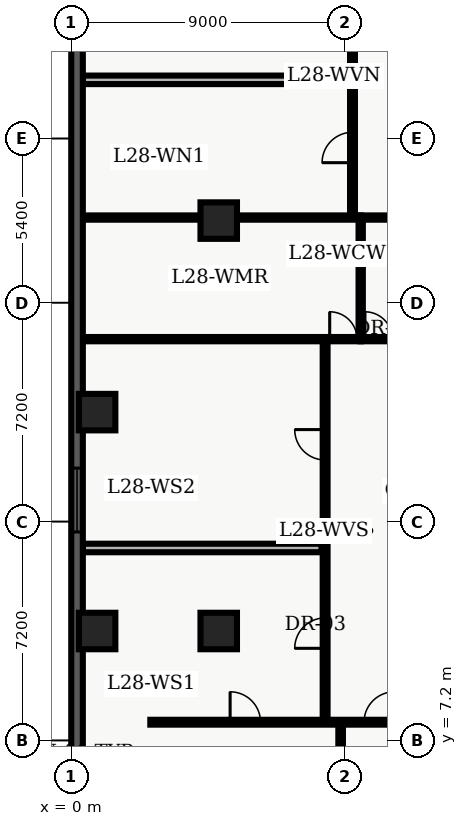
"""IFC4 building model, lengths in metres.
Left out: names, types, materials, properties, quantities, classifications, styles, units other than length and angle.
Written with IfcOpenShell. Run it as: python <this file> out.ifc"""

import sys

from ifc_helpers import new_model, entity, si_unit, converted_unit, direction, frame, origin_with_axes, origin_2d_with_axis, place, context, subcontext, project, spatial, polyline, rectangle, outline, extrude, element, fill, save


model = new_model("IFC4")
c1 = context("Model", 3, precision=1e-05, world=origin_with_axes(), true_north=direction((0.0, 1.0)))
c2 = subcontext(c1, "Body", "Model", "MODEL_VIEW")
j1 = project(units=[si_unit("LENGTHUNIT", "METRE"), converted_unit("PLANEANGLEUNIT", "DEGREE", entity("IfcPlaneAngleMeasure", 0.017), si_unit("PLANEANGLEUNIT", "RADIAN"), dimensions=[0, 0, 0, 0, 0, 0, 0])], contexts=[c1])
p1 = place(None, origin_with_axes())
s1 = spatial("IfcSite", under=j1, at=p1, CompositionType="ELEMENT")
p2 = place(p1, origin_with_axes())
s2 = spatial("IfcBuilding", under=s1, at=p2, CompositionType="ELEMENT")
p3 = place(p2, frame((0.0, 0.0, 116.4), z_axis=(0.0, 0.0, 1.0), x_axis=(1.0, 0.0, 0.0)))
s3 = spatial("IfcBuildingStorey", under=s2, at=p3, CompositionType="ELEMENT", Elevation=116.4)
for number, where, z_axis, x_axis in (
    (1, (4.85, 10.8, 0.0), (0.0, 0.0, 1.0), (1.0, 0.0, 0.0)),
    (2, (4.85, 24.3, 0.0), (0.0, 0.0, 1.0), (1.0, 0.0, 0.0)),
    (3, (0.85, 10.8, 0.0), (0.0, 0.0, 1.0), (1.0, 0.0, 0.0)),
    (4, (0.85, 18.0, 0.0), (0.0, 0.0, 1.0), (1.0, 0.0, 0.0)),
):
    element("IfcColumn", number, at=place(p3, frame(where, z_axis=z_axis, x_axis=x_axis)), inside=s3, PredefinedType="COLUMN", context=c2, shape_type="SweptSolid", body=[
        extrude(rectangle(XDim=1.2, YDim=1.2, at=origin_2d_with_axis()), origin_with_axes(), (0.0, 0.0, 1.0), 3.9),
    ])
p4 = place(p3, frame((9.52, 20.4, 0.0), z_axis=(0.0, 0.0, 1.0), x_axis=(0.0, 1.0, 0.0)))
e5 = element("IfcWall", 5, at=p4, inside=s3, PredefinedType="PARTITIONING", context=c2, shape_type="SweptSolid", body=[
    extrude(outline(polyline([(0.0, -0.07), (4.0, -0.07), (4.0, 0.07), (0.0, 0.07), (0.0, -0.07)])), origin_with_axes(), (0.0, 0.0, 1.0), 2.7),
])
p5 = place(p3, frame((9.52, 20.4, 0.0), z_axis=(0.0, 0.0, 1.0), x_axis=(1.0, 0.0, 0.0)))
e6 = element("IfcWall", 6, at=p5, inside=s3, PredefinedType="PARTITIONING", context=c2, shape_type="SweptSolid", body=[
    extrude(outline(polyline([(0.0, -0.07), (1.58, -0.07), (1.58, 0.07), (0.0, 0.07), (0.0, -0.07)])), origin_with_axes(), (0.0, 0.0, 1.0), 2.7),
])
p6 = place(p5, frame((0.59, 0.0, 0.0), z_axis=(0.0, 0.0, 1.0), x_axis=(1.0, 0.0, 0.0)))
e7 = element("IfcOpeningElement", 7, at=p6, cuts=e6, PredefinedType="OPENING", context=c2, shape_type="SweptSolid", body=[
    extrude(rectangle(XDim=0.9, YDim=0.16, at=origin_2d_with_axis()), origin_with_axes(), (0.0, 0.0, 1.0), 2.15),
])
p7 = place(p3, frame((9.52, 24.4, 0.0), z_axis=(0.0, 0.0, 1.0), x_axis=(1.0, 0.0, 0.0)))
e8 = element("IfcWall", 8, at=p7, inside=s3, PredefinedType="PARTITIONING", context=c2, shape_type="SweptSolid", body=[
    extrude(outline(polyline([(0.0, -0.07), (1.58, -0.07), (1.58, 0.07), (0.0, 0.07), (0.0, -0.07)])), origin_with_axes(), (0.0, 0.0, 1.0), 2.7),
])
p8 = place(p3, frame((2.6, 7.8, 0.0), z_axis=(0.0, 0.0, 1.0), x_axis=(1.0, 0.0, 0.0)))
e9 = element("IfcWall", 9, at=p8, inside=s3, PredefinedType="PARTITIONING", context=c2, shape_type="SweptSolid", body=[
    extrude(outline(polyline([(0.0, -0.08), (18.625, -0.08), (18.625, 0.08), (0.0, 0.08), (0.0, -0.08)])), origin_with_axes(), (0.0, 0.0, 1.0), 2.7),
])
p9 = place(p8, frame((3.125, 0.0, 0.0), z_axis=(0.0, 0.0, 1.0), x_axis=(1.0, 0.0, 0.0)))
e10 = element("IfcOpeningElement", 10, at=p9, cuts=e9, PredefinedType="OPENING", context=c2, shape_type="SweptSolid", body=[
    extrude(rectangle(XDim=1.0, YDim=0.18, at=origin_2d_with_axis()), origin_with_axes(), (0.0, 0.0, 1.0), 2.15),
])
p10 = place(p8, frame((7.53, 0.0, 0.0), z_axis=(0.0, 0.0, 1.0), x_axis=(1.0, 0.0, 0.0)))
e11 = element("IfcOpeningElement", 11, at=p10, cuts=e9, PredefinedType="OPENING", context=c2, shape_type="SweptSolid", body=[
    extrude(rectangle(XDim=1.0, YDim=0.18, at=origin_2d_with_axis()), origin_with_axes(), (0.0, 0.0, 1.0), 2.15),
])
p11 = place(p8, frame((11.271, 0.0, 0.0), z_axis=(0.0, 0.0, 1.0), x_axis=(1.0, 0.0, 0.0)))
e12 = element("IfcOpeningElement", 12, at=p11, cuts=e9, PredefinedType="OPENING", context=c2, shape_type="SweptSolid", body=[
    extrude(rectangle(XDim=1.0, YDim=0.18, at=origin_2d_with_axis()), origin_with_axes(), (0.0, 0.0, 1.0), 2.15),
])
p12 = place(p8, frame((16.12, 0.0, 0.0), z_axis=(0.0, 0.0, 1.0), x_axis=(1.0, 0.0, 0.0)))
e13 = element("IfcOpeningElement", 13, at=p12, cuts=e9, PredefinedType="OPENING", context=c2, shape_type="SweptSolid", body=[
    extrude(rectangle(XDim=1.0, YDim=0.18, at=origin_2d_with_axis()), origin_with_axes(), (0.0, 0.0, 1.0), 2.15),
])
p13 = place(p3, frame((8.35, 7.8, 0.0), z_axis=(0.0, 0.0, 1.0), x_axis=(0.0, 1.0, 0.0)))
e14 = element("IfcWall", 14, at=p13, inside=s3, PredefinedType="PARTITIONING", context=c2, shape_type="SweptSolid", body=[
    extrude(outline(polyline([(0.0, -0.08), (12.6, -0.08), (12.6, 0.08), (0.0, 0.08), (0.0, -0.08)])), origin_with_axes(), (0.0, 0.0, 1.0), 2.7),
])
p14 = place(p13, frame((2.93, 0.0, 0.0), z_axis=(0.0, 0.0, 1.0), x_axis=(1.0, 0.0, 0.0)))
e15 = element("IfcOpeningElement", 15, at=p14, cuts=e14, PredefinedType="OPENING", context=c2, shape_type="SweptSolid", body=[
    extrude(rectangle(XDim=1.0, YDim=0.18, at=origin_2d_with_axis()), origin_with_axes(), (0.0, 0.0, 1.0), 2.15),
])
p15 = place(p13, frame((9.126, 0.0, 0.0), z_axis=(0.0, 0.0, 1.0), x_axis=(1.0, 0.0, 0.0)))
e16 = element("IfcOpeningElement", 16, at=p15, cuts=e14, PredefinedType="OPENING", context=c2, shape_type="SweptSolid", body=[
    extrude(rectangle(XDim=1.0, YDim=0.18, at=origin_2d_with_axis()), origin_with_axes(), (0.0, 0.0, 1.0), 2.15),
])
p16 = place(p3, frame((9.25, 24.4, 0.0), z_axis=(0.0, 0.0, 1.0), x_axis=(0.0, 1.0, 0.0)))
e17 = element("IfcWall", 17, at=p16, inside=s3, PredefinedType="PARTITIONING", context=c2, shape_type="SweptSolid", body=[
    extrude(outline(polyline([(0.0, -0.08), (16.1, -0.08), (16.1, 0.08), (0.0, 0.08), (0.0, -0.08)])), origin_with_axes(), (0.0, 0.0, 1.0), 2.7),
])
p17 = place(p16, frame((2.305, 0.0, 0.0), z_axis=(0.0, 0.0, 1.0), x_axis=(1.0, 0.0, 0.0)))
e18 = element("IfcOpeningElement", 18, at=p17, cuts=e17, PredefinedType="OPENING", context=c2, shape_type="SweptSolid", body=[
    extrude(rectangle(XDim=1.0, YDim=0.18, at=origin_2d_with_axis()), origin_with_axes(), (0.0, 0.0, 1.0), 2.15),
])
p18 = place(p16, frame((7.098, 0.0, 0.0), z_axis=(0.0, 0.0, 1.0), x_axis=(1.0, 0.0, 0.0)))
e19 = element("IfcOpeningElement", 19, at=p18, cuts=e17, PredefinedType="OPENING", context=c2, shape_type="SweptSolid", body=[
    extrude(rectangle(XDim=1.0, YDim=0.18, at=origin_2d_with_axis()), origin_with_axes(), (0.0, 0.0, 1.0), 2.15),
])
p19 = place(p16, frame((12.819, 0.0, 0.0), z_axis=(0.0, 0.0, 1.0), x_axis=(1.0, 0.0, 0.0)))
e20 = element("IfcOpeningElement", 20, at=p19, cuts=e17, PredefinedType="OPENING", context=c2, shape_type="SweptSolid", body=[
    extrude(rectangle(XDim=1.0, YDim=0.18, at=origin_2d_with_axis()), origin_with_axes(), (0.0, 0.0, 1.0), 2.15),
])
p20 = place(p3, frame((0.36, 20.4, 0.0), z_axis=(0.0, 0.0, 1.0), x_axis=(1.0, 0.0, 0.0)))
e21 = element("IfcWall", 21, at=p20, inside=s3, PredefinedType="PARTITIONING", context=c2, shape_type="SweptSolid", body=[
    extrude(outline(polyline([(0.0, -0.07), (9.16, -0.07), (9.16, 0.07), (0.0, 0.07), (0.0, -0.07)])), origin_with_axes(), (0.0, 0.0, 1.0), 2.7),
])
p21 = place(p20, frame((8.59, 0.0, 0.0), z_axis=(0.0, 0.0, 1.0), x_axis=(1.0, 0.0, 0.0)))
e22 = element("IfcOpeningElement", 22, at=p21, cuts=e21, PredefinedType="OPENING", context=c2, shape_type="SweptSolid", body=[
    extrude(rectangle(XDim=0.9, YDim=0.16, at=origin_2d_with_axis()), origin_with_axes(), (0.0, 0.0, 1.0), 2.15),
])
p22 = place(p3, frame((0.36, 24.4, 0.0), z_axis=(0.0, 0.0, 1.0), x_axis=(1.0, 0.0, 0.0)))
e23 = element("IfcWall", 23, at=p22, inside=s3, PredefinedType="PARTITIONING", context=c2, shape_type="SweptSolid", body=[
    extrude(outline(polyline([(0.0, -0.07), (9.16, -0.07), (9.16, 0.07), (0.0, 0.07), (0.0, -0.07)])), origin_with_axes(), (0.0, 0.0, 1.0), 2.7),
])
p23 = place(p3, frame((0.375, 13.531, 0.0), z_axis=(0.0, 0.0, 1.0), x_axis=(1.0, 0.0, 0.0)))
e24 = element("IfcWall", 24, at=p23, inside=s3, PredefinedType="PARTITIONING", context=c2, shape_type="SweptSolid", body=[
    extrude(outline(polyline([(0.0, -0.14), (7.855, -0.14), (7.855, 0.14), (0.0, 0.14), (0.0, -0.14)])), origin_with_axes(), (0.0, 0.0, 1.0), 2.7),
])
p24 = place(p3, frame((0.375, 28.93, 0.0), z_axis=(0.0, 0.0, 1.0), x_axis=(1.0, 0.0, 0.0)))
e25 = element("IfcWall", 25, at=p24, inside=s3, PredefinedType="PARTITIONING", context=c2, shape_type="SweptSolid", body=[
    extrude(outline(polyline([(0.0, -0.14), (8.755, -0.14), (8.755, 0.14), (0.0, 0.14), (0.0, -0.14)])), origin_with_axes(), (0.0, 0.0, 1.0), 2.7),
])
p25 = place(p3, frame((8.86, 0.36, 0.0), z_axis=(0.0, 0.0, 1.0), x_axis=(0.0, 1.0, 0.0)))
e26 = element("IfcWall", 26, at=p25, inside=s3, PredefinedType="PARTITIONING", context=c2, shape_type="SweptSolid", body=[
    extrude(outline(polyline([(0.0, -0.075), (7.34, -0.075), (7.34, 0.075), (0.0, 0.075), (0.0, -0.075)])), origin_with_axes(), (0.0, 0.0, 1.0), 2.7),
])
p26 = place(p3, frame((0.19, 2.78, 0.0), z_axis=(0.0, 0.0, 1.0), x_axis=(0.0, 1.0, 0.0)))
e27 = element("IfcWall", 27, at=p26, inside=s3, PredefinedType="SOLIDWALL", context=c2, shape_type="SweptSolid", body=[
    extrude(outline(polyline([(0.0, -0.19), (43.42, -0.19), (43.42, 0.19), (0.0, 0.19), (0.0, -0.19)])), origin_with_axes(), (0.0, 0.0, 1.0), 3.66),
])
p27 = place(p26, frame((2.946, 0.0, 0.45), z_axis=(0.0, 0.0, 1.0), x_axis=(1.0, 0.0, 0.0)))
e28 = element("IfcOpeningElement", 28, at=p27, cuts=e27, PredefinedType="OPENING", context=c2, shape_type="SweptSolid", body=[
    extrude(rectangle(XDim=2.1, YDim=0.4, at=origin_2d_with_axis()), origin_with_axes(), (0.0, 0.0, 1.0), 2.2),
])
p28 = place(p26, frame((12.328, 0.0, 0.45), z_axis=(0.0, 0.0, 1.0), x_axis=(1.0, 0.0, 0.0)))
e29 = element("IfcOpeningElement", 29, at=p28, cuts=e27, PredefinedType="OPENING", context=c2, shape_type="SweptSolid", body=[
    extrude(rectangle(XDim=2.1, YDim=0.4, at=origin_2d_with_axis()), origin_with_axes(), (0.0, 0.0, 1.0), 2.2),
])
p29 = place(p26, frame((40.024, 0.0, 0.45), z_axis=(0.0, 0.0, 1.0), x_axis=(1.0, 0.0, 0.0)))
e30 = element("IfcOpeningElement", 30, at=p29, cuts=e27, PredefinedType="OPENING", context=c2, shape_type="SweptSolid", body=[
    extrude(rectangle(XDim=2.1, YDim=0.4, at=origin_2d_with_axis()), origin_with_axes(), (0.0, 0.0, 1.0), 2.2),
])
p30 = place(p5, frame((0.59, 0.0, 0.0), z_axis=(0.0, 0.0, 1.0), x_axis=(1.0, 0.0, 0.0)))
e31 = element("IfcDoor", 31, at=p30, inside=s3, OperationType="SINGLE_SWING_LEFT", PredefinedType="DOOR", context=c2, shape_type="SweptSolid", body=[
    extrude(rectangle(XDim=0.9, YDim=0.084, at=origin_2d_with_axis()), origin_with_axes(), (0.0, 0.0, 1.0), 2.15),
])
fill(e7, e31)
p31 = place(p20, frame((8.59, 0.0, 0.0), z_axis=(0.0, 0.0, 1.0), x_axis=(1.0, 0.0, 0.0)))
e32 = element("IfcDoor", 32, at=p31, inside=s3, OperationType="SINGLE_SWING_LEFT", PredefinedType="DOOR", context=c2, shape_type="SweptSolid", body=[
    extrude(rectangle(XDim=0.9, YDim=0.084, at=origin_2d_with_axis()), origin_with_axes(), (0.0, 0.0, 1.0), 2.15),
])
fill(e22, e32)
p32 = place(p13, frame((2.93, 0.0, 0.0), z_axis=(0.0, 0.0, 1.0), x_axis=(1.0, 0.0, 0.0)))
e33 = element("IfcDoor", 33, at=p32, inside=s3, OperationType="SINGLE_SWING_LEFT", PredefinedType="DOOR", context=c2, shape_type="SweptSolid", body=[
    extrude(rectangle(XDim=1.0, YDim=0.09, at=origin_2d_with_axis()), origin_with_axes(), (0.0, 0.0, 1.0), 2.15),
])
fill(e15, e33)
p33 = place(p13, frame((9.126, 0.0, 0.0), z_axis=(0.0, 0.0, 1.0), x_axis=(1.0, 0.0, 0.0)))
e34 = element("IfcDoor", 34, at=p33, inside=s3, OperationType="SINGLE_SWING_RIGHT", PredefinedType="DOOR", context=c2, shape_type="SweptSolid", body=[
    extrude(rectangle(XDim=1.0, YDim=0.09, at=origin_2d_with_axis()), origin_with_axes(), (0.0, 0.0, 1.0), 2.15),
])
fill(e16, e34)
p34 = place(p16, frame((2.305, 0.0, 0.0), z_axis=(0.0, 0.0, 1.0), x_axis=(1.0, 0.0, 0.0)))
e35 = element("IfcDoor", 35, at=p34, inside=s3, OperationType="SINGLE_SWING_LEFT", PredefinedType="DOOR", context=c2, shape_type="SweptSolid", body=[
    extrude(rectangle(XDim=1.0, YDim=0.09, at=origin_2d_with_axis()), origin_with_axes(), (0.0, 0.0, 1.0), 2.15),
])
fill(e18, e35)
p35 = place(p8, frame((3.125, 0.0, 0.0), z_axis=(0.0, 0.0, 1.0), x_axis=(1.0, 0.0, 0.0)))
e36 = element("IfcDoor", 36, at=p35, inside=s3, OperationType="SINGLE_SWING_LEFT", PredefinedType="DOOR", context=c2, shape_type="SweptSolid", body=[
    extrude(rectangle(XDim=1.0, YDim=0.09, at=origin_2d_with_axis()), origin_with_axes(), (0.0, 0.0, 1.0), 2.15),
])
fill(e10, e36)
p36 = place(p8, frame((7.53, 0.0, 0.0), z_axis=(0.0, 0.0, 1.0), x_axis=(1.0, 0.0, 0.0)))
e37 = element("IfcDoor", 37, at=p36, inside=s3, OperationType="SINGLE_SWING_RIGHT", PredefinedType="DOOR", context=c2, shape_type="SweptSolid", body=[
    extrude(rectangle(XDim=1.0, YDim=0.09, at=origin_2d_with_axis()), origin_with_axes(), (0.0, 0.0, 1.0), 2.15),
])
fill(e11, e37)
p37 = place(p26, frame((12.328, 0.0, 0.45), z_axis=(0.0, 0.0, 1.0), x_axis=(1.0, 0.0, 0.0)))
e38 = element("IfcWindow", 38, at=p37, inside=s3, PredefinedType="WINDOW", context=c2, shape_type="SweptSolid", body=[
    extrude(rectangle(XDim=2.1, YDim=0.09, at=origin_2d_with_axis()), origin_with_axes(), (0.0, 0.0, 1.0), 2.2),
])
fill(e29, e38)
save(model, sys.argv[1])
